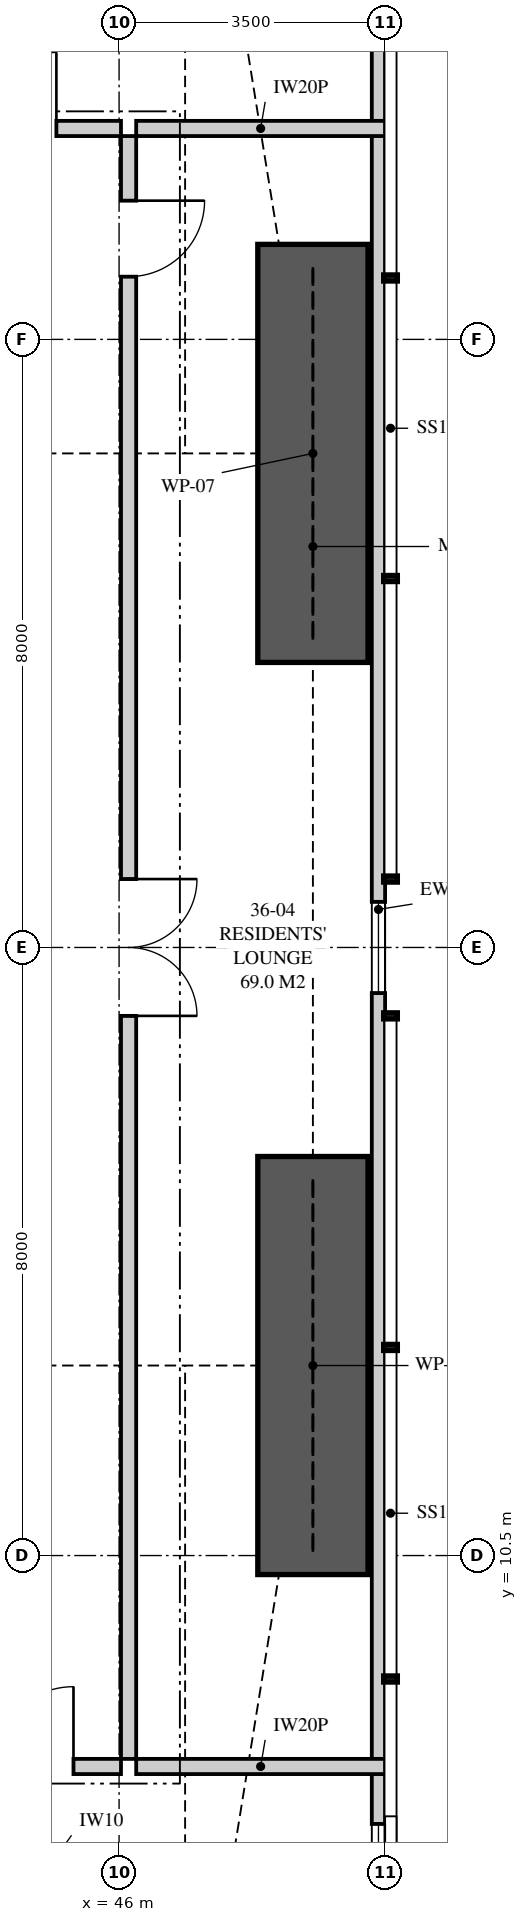
"""IFC4 building model, lengths in metres.
Left out: names, types, materials, properties, quantities, classifications, styles, units other than length and angle.
Written with IfcOpenShell. Run it as: python <this file> out.ifc"""

import sys

from ifc_helpers import new_model, si_unit, direction, frame, frame_2d, origin, place, context, subcontext, project, spatial, polyline, rectangle, outline, extrude, element, fill, save


model = new_model("IFC4")
c1 = context("Model", 3, precision=1e-05, world=origin(), true_north=direction((0.0, 1.0)))
c2 = subcontext(c1, "Body", "Model", "MODEL_VIEW")
j1 = project(units=[si_unit("LENGTHUNIT", "METRE"), si_unit("PLANEANGLEUNIT", "RADIAN")], contexts=[c1])
p1 = place(None, origin())
s1 = spatial("IfcSite", under=j1, at=p1, CompositionType="ELEMENT")
p2 = place(p1, origin())
s2 = spatial("IfcBuilding", under=s1, at=p2, CompositionType="ELEMENT")
p3 = place(p2, frame((0.0, 0.0, 131.65)))
s3 = spatial("IfcBuildingStorey", under=s2, at=p3, CompositionType="ELEMENT", Elevation=131.65)
p4 = place(p3, frame((49.413, 3.051, 0.0), z_axis=(0.0, 0.0, 1.0), x_axis=(0.0, 1.0, 0.0)))
e1 = element("IfcWall", 1, at=p4, inside=s3, PredefinedType="SOLIDWALL", context=c2, shape_type="SweptSolid", body=[
    extrude(outline(polyline([(0.0, 0.0), (31.897, 0.0), (31.897, 3.11), (22.167, 3.11), (22.167, 2.15), (22.074, 2.15), (22.074, 3.11), (21.949, 3.11), (21.949, 2.15), (9.949, 2.15), (9.949, 3.11), (9.823, 3.11), (9.823, 2.15), (9.73, 2.15), (9.73, 3.11), (0.0, 3.11), (0.0, 0.0)])), frame((0.0, 0.087, 0.0), z_axis=(0.0, -1.0, 0.0), x_axis=(1.0, 0.0, 0.0)), (0.0, 0.0, 1.0), 0.175),
])
p5 = place(p4, frame((2.118, 0.0, 0.4)))
e2 = element("IfcOpeningElement", 2, at=p5, cuts=e1, PredefinedType="OPENING", context=c2, shape_type="SweptSolid", body=[
    extrude(rectangle(XDim=1.8, YDim=1.7, at=frame_2d((0.9, 0.85))), frame((0.0, 0.097, 0.0), z_axis=(0.0, -1.0, 0.0), x_axis=(1.0, 0.0, 0.0)), (0.0, 0.0, 1.0), 0.195),
])
p6 = place(p4, frame((14.849, 0.0, 0.4)))
e3 = element("IfcOpeningElement", 3, at=p6, cuts=e1, PredefinedType="OPENING", context=c2, shape_type="SweptSolid", body=[
    extrude(rectangle(XDim=1.2, YDim=1.7, at=frame_2d((0.6, 0.85))), frame((0.0, 0.097, 0.0), z_axis=(0.0, -1.0, 0.0), x_axis=(1.0, 0.0, 0.0)), (0.0, 0.0, 1.0), 0.195),
])
p7 = place(p4, frame((28.51, 0.0, 0.4)))
e4 = element("IfcOpeningElement", 4, at=p7, cuts=e1, PredefinedType="OPENING", context=c2, shape_type="SweptSolid", body=[
    extrude(rectangle(XDim=1.2, YDim=1.7, at=frame_2d((0.6, 0.85))), frame((0.0, 0.097, 0.0), z_axis=(0.0, -1.0, 0.0), x_axis=(1.0, 0.0, 0.0)), (0.0, 0.0, 1.0), 0.195),
])
p8 = place(p3, frame((40.3, 7.725, 0.0), z_axis=(0.0, 0.0, 1.0), x_axis=(1.0, 0.0, 0.0)))
e5 = element("IfcWall", 5, at=p8, inside=s3, PredefinedType="PARTITIONING", context=c2, shape_type="SweptSolid", body=[
    extrude(rectangle(XDim=5.725, YDim=0.2, at=frame_2d((2.862, 0.0))), origin(), (0.0, 0.0, 1.0), 3.11),
])
p9 = place(p8, frame((4.05, 0.0, 0.0)))
e6 = element("IfcOpeningElement", 6, at=p9, cuts=e5, PredefinedType="OPENING", context=c2, shape_type="SweptSolid", body=[
    extrude(rectangle(XDim=1.05, YDim=2.2, at=frame_2d((0.525, 1.1))), frame((0.0, 0.11, 0.0), z_axis=(0.0, -1.0, 0.0), x_axis=(1.0, 0.0, 0.0)), (0.0, 0.0, 1.0), 0.22),
])
p10 = place(p3, frame((46.225, 7.725, 0.0), z_axis=(0.0, 0.0, 1.0), x_axis=(1.0, 0.0, 0.0)))
e7 = element("IfcWall", 7, at=p10, inside=s3, PredefinedType="PARTITIONING", context=c2, shape_type="SweptSolid", body=[
    extrude(outline(polyline([(0.0, 0.0), (3.275, 0.0), (3.275, 3.11), (2.392, 3.11), (2.392, 2.15), (0.643, 2.15), (0.643, 2.541), (0.306, 2.541), (0.306, 3.11), (0.0, 3.11), (0.0, 0.0)])), frame((0.0, 0.1, 0.0), z_axis=(0.0, -1.0, 0.0), x_axis=(1.0, 0.0, 0.0)), (0.0, 0.0, 1.0), 0.2),
])
p11 = place(p3, frame((46.225, 29.275, 0.0), z_axis=(0.0, 0.0, 1.0), x_axis=(1.0, 0.0, 0.0)))
e8 = element("IfcWall", 8, at=p11, inside=s3, PredefinedType="PARTITIONING", context=c2, shape_type="SweptSolid", body=[
    extrude(outline(polyline([(0.0, 0.0), (3.275, 0.0), (3.275, 3.11), (2.554, 3.11), (2.554, 2.15), (0.805, 2.15), (0.805, 2.541), (0.306, 2.541), (0.306, 3.11), (0.0, 3.11), (0.0, 0.0)])), frame((0.0, 0.1, 0.0), z_axis=(0.0, -1.0, 0.0), x_axis=(1.0, 0.0, 0.0)), (0.0, 0.0, 1.0), 0.2),
])
p12 = place(p3, frame((46.125, 7.825, 0.0), z_axis=(0.0, 0.0, 1.0), x_axis=(0.0, 1.0, 0.0)))
e9 = element("IfcWall", 9, at=p12, inside=s3, PredefinedType="PARTITIONING", context=c2, shape_type="SweptSolid", body=[
    extrude(outline(polyline([(0.0, 0.0), (21.35, 0.0), (21.35, 3.11), (17.512, 3.11), (17.512, 2.541), (16.838, 2.541), (16.838, 3.11), (5.512, 3.11), (5.512, 2.541), (4.838, 2.541), (4.838, 3.11), (0.0, 3.11), (0.0, 0.0)])), frame((0.0, 0.1, 0.0), z_axis=(0.0, -1.0, 0.0), x_axis=(1.0, 0.0, 0.0)), (0.0, 0.0, 1.0), 0.2),
])
p13 = place(p12, frame((9.775, 0.0, 0.0)))
e10 = element("IfcOpeningElement", 10, at=p13, cuts=e9, PredefinedType="OPENING", context=c2, shape_type="SweptSolid", body=[
    extrude(rectangle(XDim=1.8, YDim=2.1, at=frame_2d((0.9, 1.05))), frame((0.0, 0.11, 0.0), z_axis=(0.0, -1.0, 0.0), x_axis=(1.0, 0.0, 0.0)), (0.0, 0.0, 1.0), 0.22),
])
p14 = place(p12, frame((19.5, 0.0, 0.0)))
e11 = element("IfcOpeningElement", 11, at=p14, cuts=e9, PredefinedType="OPENING", context=c2, shape_type="SweptSolid", body=[
    extrude(rectangle(XDim=1.0, YDim=2.1, at=frame_2d((0.5, 1.05))), frame((0.0, 0.11, 0.0), z_axis=(0.0, -1.0, 0.0), x_axis=(1.0, 0.0, 0.0)), (0.0, 0.0, 1.0), 0.22),
])
p15 = place(p3, frame((38.312, 29.275, 0.0), z_axis=(0.0, 0.0, 1.0), x_axis=(1.0, 0.0, 0.0)))
e12 = element("IfcWall", 12, at=p15, inside=s3, PredefinedType="PARTITIONING", context=c2, shape_type="SweptSolid", body=[
    extrude(outline(polyline([(0.0, 0.0), (7.712, 0.0), (7.712, 3.11), (0.65, 3.11), (0.65, 2.541), (0.0, 2.541), (0.0, 3.11), (0.0, 0.0)])), frame((0.0, 0.1, 0.0), z_axis=(0.0, -1.0, 0.0), x_axis=(1.0, 0.0, 0.0)), (0.0, 0.0, 1.0), 0.2),
])
p16 = place(p15, frame((5.863, 0.0, 0.0)))
e13 = element("IfcOpeningElement", 13, at=p16, cuts=e12, PredefinedType="OPENING", context=c2, shape_type="SweptSolid", body=[
    extrude(rectangle(XDim=1.0, YDim=2.1, at=frame_2d((0.5, 1.05))), frame((0.0, 0.11, 0.0), z_axis=(0.0, -1.0, 0.0), x_axis=(1.0, 0.0, 0.0)), (0.0, 0.0, 1.0), 0.22),
])
for number, where, z_axis, x_axis in (
    (14, (48.55, 10.25, 0.0), (0.0, 0.0, 1.0), (0.0, 1.0, 0.0)),
    (15, (48.55, 22.25, 0.0), (0.0, 0.0, 1.0), (0.0, 1.0, 0.0)),
):
    element("IfcWall", number, at=place(p3, frame(where, z_axis=z_axis, x_axis=x_axis)), inside=s3, PredefinedType="SHEAR", context=c2, shape_type="SweptSolid", body=[
        extrude(rectangle(XDim=5.5, YDim=1.45, at=frame_2d((2.75, 0.0))), origin(), (0.0, 0.0, 1.0), 3.35),
    ])
p17 = place(p5, origin())
e16 = element("IfcWindow", 16, at=p17, inside=s3, PartitioningType="SINGLE_PANEL", PredefinedType="WINDOW", context=c2, shape_type="SweptSolid", body=[
    extrude(rectangle(XDim=1.8, YDim=1.7, at=frame_2d((0.9, 0.85))), frame((0.0, 0.03, 0.0), z_axis=(0.0, -1.0, 0.0), x_axis=(1.0, 0.0, 0.0)), (0.0, 0.0, 1.0), 0.06),
])
fill(e2, e16)
p18 = place(p6, origin())
e17 = element("IfcWindow", 17, at=p18, inside=s3, PartitioningType="SINGLE_PANEL", PredefinedType="WINDOW", context=c2, shape_type="SweptSolid", body=[
    extrude(rectangle(XDim=1.2, YDim=1.7, at=frame_2d((0.6, 0.85))), frame((0.0, 0.03, 0.0), z_axis=(0.0, -1.0, 0.0), x_axis=(1.0, 0.0, 0.0)), (0.0, 0.0, 1.0), 0.06),
])
fill(e3, e17)
p19 = place(p9, origin())
e18 = element("IfcDoor", 18, at=p19, inside=s3, OperationType="SINGLE_SWING_RIGHT", PredefinedType="DOOR", context=c2, shape_type="SweptSolid", body=[
    extrude(rectangle(XDim=1.05, YDim=2.2, at=frame_2d((0.525, 1.1))), frame((0.0, 0.025, 0.0), z_axis=(0.0, -1.0, 0.0), x_axis=(1.0, 0.0, 0.0)), (0.0, 0.0, 1.0), 0.05),
])
fill(e6, e18)
p20 = place(p16, origin())
e19 = element("IfcDoor", 19, at=p20, inside=s3, OperationType="SINGLE_SWING_RIGHT", PredefinedType="DOOR", context=c2, shape_type="SweptSolid", body=[
    extrude(rectangle(XDim=1.0, YDim=2.1, at=frame_2d((0.5, 1.05))), frame((0.0, 0.025, 0.0), z_axis=(0.0, -1.0, 0.0), x_axis=(1.0, 0.0, 0.0)), (0.0, 0.0, 1.0), 0.05),
])
fill(e13, e19)
p21 = place(p13, frame((1.8, 0.0, 0.0), z_axis=(0.0, 0.0, 1.0), x_axis=(-1.0, 0.0, 0.0)))
e20 = element("IfcDoor", 20, at=p21, inside=s3, OperationType="DOUBLE_DOOR_SINGLE_SWING", PredefinedType="DOOR", context=c2, shape_type="SweptSolid", body=[
    extrude(rectangle(XDim=1.8, YDim=2.1, at=frame_2d((0.9, 1.05))), frame((0.0, 0.025, 0.0), z_axis=(0.0, -1.0, 0.0), x_axis=(1.0, 0.0, 0.0)), (0.0, 0.0, 1.0), 0.05),
])
fill(e10, e20)
p22 = place(p14, frame((1.0, 0.0, 0.0), z_axis=(0.0, 0.0, 1.0), x_axis=(-1.0, 0.0, 0.0)))
e21 = element("IfcDoor", 21, at=p22, inside=s3, OperationType="SINGLE_SWING_LEFT", PredefinedType="DOOR", context=c2, shape_type="SweptSolid", body=[
    extrude(rectangle(XDim=1.0, YDim=2.1, at=frame_2d((0.5, 1.05))), frame((0.0, 0.025, 0.0), z_axis=(0.0, -1.0, 0.0), x_axis=(1.0, 0.0, 0.0)), (0.0, 0.0, 1.0), 0.05),
])
fill(e11, e21)
save(model, sys.argv[1])
